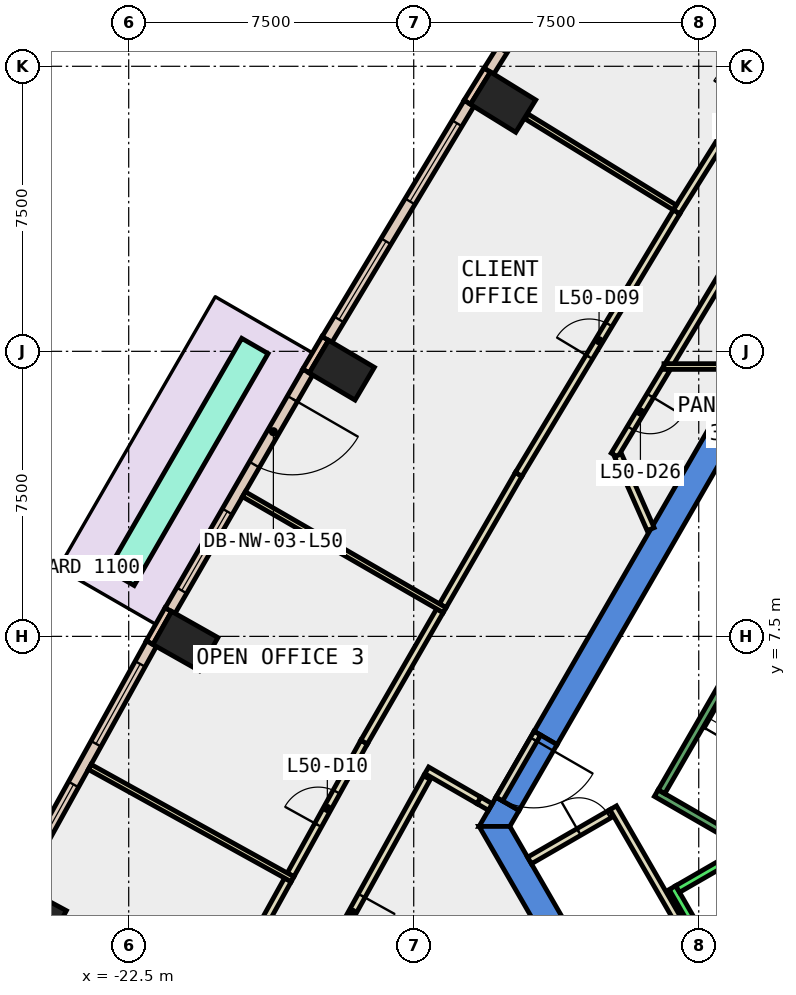
"""IFC4 building model, lengths in metres.
Left out: names, types, materials, properties, quantities, classifications, styles, units other than length and angle.
Written with IfcOpenShell. Run it as: python <this file> out.ifc"""

import sys

from ifc_helpers import new_model, si_unit, direction, frame, frame_2d, origin, origin_2d, place, context, subcontext, project, spatial, polyline, rectangle, outline, extrude, element, fill, save


model = new_model("IFC4")
c1 = context("Model", 3, precision=1e-05, world=origin(), true_north=direction((0.0, 1.0)))
c2 = subcontext(c1, "Body", "Model", "MODEL_VIEW")
j1 = project(units=[si_unit("LENGTHUNIT", "METRE"), si_unit("PLANEANGLEUNIT", "RADIAN")], contexts=[c1])
p1 = place(None, origin())
s1 = spatial("IfcSite", under=j1, at=p1, CompositionType="ELEMENT")
p2 = place(p1, origin())
s2 = spatial("IfcBuilding", under=s1, at=p2, CompositionType="ELEMENT")
p3 = place(p2, frame((0.0, 0.0, 223.4)))
s3 = spatial("IfcBuildingStorey", under=s2, at=p3, CompositionType="ELEMENT", Elevation=223.4)
for number, where, z_axis, x_axis in (
    (1, (-12.648, 21.557, -0.4), (0.0, 0.0, 1.0), (0.525, 0.851, 0.0)),
    (2, (-16.892, 14.504, -0.4), (0.0, 0.0, 1.0), (0.509, 0.861, 0.0)),
    (3, (-21.007, 7.377, -0.4), (0.0, 0.0, 1.0), (0.491, 0.871, 0.0)),
    (4, (-24.993, 0.175, -0.4), (0.0, 0.0, 1.0), (0.474, 0.88, 0.0)),
):
    element("IfcColumn", number, at=place(p3, frame(where, z_axis=z_axis, x_axis=x_axis)), inside=s3, PredefinedType="COLUMN", context=c2, shape_type="SweptSolid", body=[
        extrude(rectangle(XDim=1.0, YDim=1.4, at=origin_2d()), origin(), (0.0, 0.0, 1.0), 4.2),
    ])
p4 = place(p3, frame((0.0, 0.0, -0.4)))
e5 = element("IfcWall", 5, at=p4, inside=s3, PredefinedType="SHEAR", context=c2, shape_type="SweptSolid", body=[
    extrude(outline(polyline([(-11.834, 5.002), (-11.228, 4.652), (-6.235, 13.3), (-6.64, 14.0), (-11.834, 5.002)])), origin(), (0.0, 0.0, 1.0), 4.2),
])
p5 = place(p3, frame((0.0, 0.0, -0.4)))
e6 = element("IfcWall", 6, at=p5, inside=s3, PredefinedType="SHEAR", context=c2, shape_type="SweptSolid", body=[
    extrude(outline(polyline([(-12.228, 2.92), (-12.834, 3.27), (-13.279, 2.5), (-12.471, 2.5), (-12.228, 2.92)])), origin(), (0.0, 0.0, 1.0), 4.2),
])
p6 = place(p3, frame((0.0, 0.0, 3.6)))
e7 = element("IfcWall", 7, at=p6, inside=s3, PredefinedType="SHEAR", context=c2, shape_type="SweptSolid", body=[
    extrude(outline(polyline([(-12.834, 3.27), (-12.228, 2.92), (-11.228, 4.652), (-11.834, 5.002), (-12.834, 3.27)])), origin(), (0.0, 0.0, 1.0), 0.2),
])
p7 = place(p3, frame((0.0, 0.0, -0.4)))
e8 = element("IfcWall", 8, at=p7, inside=s3, PredefinedType="SHEAR", context=c2, shape_type="SweptSolid", body=[
    extrude(outline(polyline([(-13.279, 2.5), (-6.64, -9.0), (-6.235, -8.3), (-12.471, 2.5), (-13.279, 2.5)])), origin(), (0.0, 0.0, 1.0), 4.2),
])
p8 = place(p3, frame((-13.066, 22.403, 0.0), z_axis=(0.0, 0.0, 1.0), x_axis=(-0.525825307325, -0.850592585306, 0.0)))
e9 = element("IfcWall", 9, at=p8, inside=s3, PredefinedType="STANDARD", context=c2, shape_type="SweptSolid", body=[
    extrude(rectangle(XDim=1.0, YDim=0.2, at=frame_2d((0.5, 0.0))), origin(), (0.0, 0.0, 1.0), 3.8),
])
p9 = place(p3, frame((-17.327, 15.342, 0.0), z_axis=(0.0, 0.0, 1.0), x_axis=(-0.508161541526, -0.861261776531, 0.0)))
e10 = element("IfcWall", 10, at=p9, inside=s3, PredefinedType="STANDARD", context=c2, shape_type="SweptSolid", body=[
    extrude(rectangle(XDim=1.0, YDim=0.2, at=frame_2d((0.5, 0.0))), origin(), (0.0, 0.0, 1.0), 3.8),
])
p10 = place(p3, frame((-21.458, 8.205, 0.0), z_axis=(0.0, 0.0, 1.0), x_axis=(-0.491743606947, -0.87074004446, 0.0)))
e11 = element("IfcWall", 11, at=p10, inside=s3, PredefinedType="STANDARD", context=c2, shape_type="SweptSolid", body=[
    extrude(rectangle(XDim=1.0, YDim=0.2, at=frame_2d((0.5, 0.0))), origin(), (0.0, 0.0, 1.0), 3.8),
])
p11 = place(p3, frame((-9.122, 28.592, 0.0), z_axis=(0.0, 0.0, 1.0), x_axis=(-0.531239262679, -0.847221839773, 0.0)))
e12 = element("IfcWall", 12, at=p11, inside=s3, PredefinedType="STANDARD", context=c2, shape_type="SweptSolid", body=[
    extrude(rectangle(XDim=7.339, YDim=0.3, at=frame_2d((3.67, 0.0))), origin(), (0.0, 0.0, 1.0), 3.8),
])
p12 = place(p11, frame((0.635, 0.0, 0.9)))
e13 = element("IfcOpeningElement", 13, at=p12, cuts=e12, PredefinedType="OPENING", context=c2, shape_type="SweptSolid", body=[
    extrude(rectangle(XDim=2.4, YDim=2.6, at=frame_2d((1.2, 1.3))), frame((0.0, 0.16, 0.0), z_axis=(0.0, -1.0, 0.0), x_axis=(1.0, 0.0, 0.0)), (0.0, 0.0, 1.0), 0.32),
])
p13 = place(p11, frame((4.304, 0.0, 0.9)))
e14 = element("IfcOpeningElement", 14, at=p13, cuts=e12, PredefinedType="OPENING", context=c2, shape_type="SweptSolid", body=[
    extrude(rectangle(XDim=2.4, YDim=2.6, at=frame_2d((1.2, 1.3))), frame((0.0, 0.16, 0.0), z_axis=(0.0, -1.0, 0.0), x_axis=(1.0, 0.0, 0.0)), (0.0, 0.0, 1.0), 0.32),
])
p14 = place(p3, frame((-13.544, 21.524, 0.0), z_axis=(0.0, 0.0, 1.0), x_axis=(-0.515560283412, -0.856853309597, 0.0)))
e15 = element("IfcWall", 15, at=p14, inside=s3, PredefinedType="STANDARD", context=c2, shape_type="SweptSolid", body=[
    extrude(rectangle(XDim=7.249, YDim=0.3, at=frame_2d((3.624, 0.0))), origin(), (0.0, 0.0, 1.0), 3.8),
])
p15 = place(p14, frame((0.612, 0.0, 0.9)))
e16 = element("IfcOpeningElement", 16, at=p15, cuts=e15, PredefinedType="OPENING", context=c2, shape_type="SweptSolid", body=[
    extrude(rectangle(XDim=2.4, YDim=2.6, at=frame_2d((1.2, 1.3))), frame((0.0, 0.16, 0.0), z_axis=(0.0, -1.0, 0.0), x_axis=(1.0, 0.0, 0.0)), (0.0, 0.0, 1.0), 0.32),
])
p16 = place(p14, frame((4.236, 0.0, 0.9)))
e17 = element("IfcOpeningElement", 17, at=p16, cuts=e15, PredefinedType="OPENING", context=c2, shape_type="SweptSolid", body=[
    extrude(rectangle(XDim=2.4, YDim=2.6, at=frame_2d((1.2, 1.3))), frame((0.0, 0.16, 0.0), z_axis=(0.0, -1.0, 0.0), x_axis=(1.0, 0.0, 0.0)), (0.0, 0.0, 1.0), 0.32),
])
p17 = place(p3, frame((-17.787, 14.454, 0.0), z_axis=(0.0, 0.0, 1.0), x_axis=(-0.499968351115, -0.866043675505, 0.0)))
e18 = element("IfcWall", 18, at=p17, inside=s3, PredefinedType="STANDARD", context=c2, shape_type="SweptSolid", body=[
    extrude(rectangle(XDim=7.248, YDim=0.3, at=frame_2d((3.624, 0.0))), origin(), (0.0, 0.0, 1.0), 3.8),
])
p18 = place(p17, frame((0.812, 0.0, 0.0)))
e19 = element("IfcOpeningElement", 19, at=p18, cuts=e18, PredefinedType="OPENING", context=c2, shape_type="SweptSolid", body=[
    extrude(rectangle(XDim=2.0, YDim=2.4, at=frame_2d((1.0, 1.2))), frame((0.0, 0.16, 0.0), z_axis=(0.0, -1.0, 0.0), x_axis=(1.0, 0.0, 0.0)), (0.0, 0.0, 1.0), 0.32),
])
p19 = place(p17, frame((4.236, 0.0, 0.9)))
e20 = element("IfcOpeningElement", 20, at=p19, cuts=e18, PredefinedType="OPENING", context=c2, shape_type="SweptSolid", body=[
    extrude(rectangle(XDim=2.4, YDim=2.6, at=frame_2d((1.2, 1.3))), frame((0.0, 0.16, 0.0), z_axis=(0.0, -1.0, 0.0), x_axis=(1.0, 0.0, 0.0)), (0.0, 0.0, 1.0), 0.32),
])
p20 = place(p3, frame((-21.902, 7.309, 0.0), z_axis=(0.0, 0.0, 1.0), x_axis=(-0.484163461668, -0.87497756679, 0.0)))
e21 = element("IfcWall", 21, at=p20, inside=s3, PredefinedType="STANDARD", context=c2, shape_type="SweptSolid", body=[
    extrude(rectangle(XDim=7.247, YDim=0.3, at=frame_2d((3.624, 0.0))), origin(), (0.0, 0.0, 1.0), 3.8),
])
p21 = place(p20, frame((0.612, 0.0, 0.9)))
e22 = element("IfcOpeningElement", 22, at=p21, cuts=e21, PredefinedType="OPENING", context=c2, shape_type="SweptSolid", body=[
    extrude(rectangle(XDim=2.4, YDim=2.6, at=frame_2d((1.2, 1.3))), frame((0.0, 0.16, 0.0), z_axis=(0.0, -1.0, 0.0), x_axis=(1.0, 0.0, 0.0)), (0.0, 0.0, 1.0), 0.32),
])
p22 = place(p20, frame((4.235, 0.0, 0.9)))
e23 = element("IfcOpeningElement", 23, at=p22, cuts=e21, PredefinedType="OPENING", context=c2, shape_type="SweptSolid", body=[
    extrude(rectangle(XDim=2.4, YDim=2.6, at=frame_2d((1.2, 1.3))), frame((0.0, 0.16, 0.0), z_axis=(0.0, -1.0, 0.0), x_axis=(1.0, 0.0, 0.0)), (0.0, 0.0, 1.0), 0.32),
])
p23 = place(p3, frame((-19.179, 15.142, 0.0), z_axis=(0.0, 0.0, 1.0), x_axis=(-0.500036321933, -0.866004432291, 0.0)))
e24 = element("IfcWall", 24, at=p23, inside=s3, PredefinedType="STANDARD", context=c2, shape_type="SweptSolid", body=[
    extrude(rectangle(XDim=7.047, YDim=0.8, at=frame_2d((3.524, 0.0))), origin(), (0.0, 0.0, 1.0), 0.8),
])
p24 = place(p3, frame((-8.353, 14.536, 0.0), z_axis=(0.0, 0.0, 1.0), x_axis=(-0.515636196259, -0.856807628997, 0.0)))
e25 = element("IfcWall", 25, at=p24, inside=s3, PredefinedType="PARTITIONING", context=c2, shape_type="SweptSolid", body=[
    extrude(rectangle(XDim=2.643, YDim=0.2, at=frame_2d((1.322, 0.0))), origin(), (0.0, 0.0, 1.0), 3.8),
])
p25 = place(p24, frame((0.822, 0.0, 0.0)))
e26 = element("IfcOpeningElement", 26, at=p25, cuts=e25, PredefinedType="OPENING", context=c2, shape_type="SweptSolid", body=[
    extrude(rectangle(XDim=1.0, YDim=2.1, at=frame_2d((0.5, 1.05))), frame((0.0, 0.11, 0.0), z_axis=(0.0, -1.0, 0.0), x_axis=(1.0, 0.0, 0.0)), (0.0, 0.0, 1.0), 0.22),
])
p26 = place(p3, frame((-9.624, 12.265, 0.0), z_axis=(0.0, 0.0, 1.0), x_axis=(0.404081180606, -0.914723127225, 0.0)))
e27 = element("IfcWall", 27, at=p26, inside=s3, PredefinedType="PARTITIONING", context=c2, shape_type="SweptSolid", body=[
    extrude(rectangle(XDim=2.126, YDim=0.2, at=frame_2d((1.063, 0.0))), origin(), (0.0, 0.0, 1.0), 3.8),
])
p27 = place(p3, frame((-6.427, 17.738, 0.0), z_axis=(0.0, 0.0, 1.0), x_axis=(-0.515416266777, -0.85693994652, 0.0)))
e28 = element("IfcWall", 28, at=p27, inside=s3, PredefinedType="PARTITIONING", context=c2, shape_type="SweptSolid", body=[
    extrude(rectangle(XDim=3.587, YDim=0.2, at=frame_2d((1.793, 0.0))), origin(), (0.0, 0.0, 1.0), 3.8),
])
p28 = place(p3, frame((-12.984, 3.01, 0.0), z_axis=(0.0, 0.0, 1.0), x_axis=(-0.866046247233, 0.49996389635, 0.0)))
e29 = element("IfcWall", 29, at=p28, inside=s3, PredefinedType="PARTITIONING", context=c2, shape_type="SweptSolid", body=[
    extrude(rectangle(XDim=0.35, YDim=0.2, at=frame_2d((0.175, 0.0))), origin(), (0.0, 0.0, 1.0), 2.4),
])
p29 = place(p3, frame((-14.652, 3.783, 0.0), z_axis=(0.0, 0.0, 1.0), x_axis=(-0.484249955458, -0.874929700398, 0.0)))
e30 = element("IfcWall", 30, at=p29, inside=s3, PredefinedType="PARTITIONING", context=c2, shape_type="SweptSolid", body=[
    extrude(rectangle(XDim=8.099, YDim=0.2, at=frame_2d((4.049, 0.0))), origin(), (0.0, 0.0, 1.0), 3.8),
])
p30 = place(p29, frame((3.55, 0.0, 0.0)))
e31 = element("IfcOpeningElement", 31, at=p30, cuts=e30, PredefinedType="OPENING", context=c2, shape_type="SweptSolid", body=[
    extrude(rectangle(XDim=1.0, YDim=2.1, at=frame_2d((0.5, 1.05))), frame((0.0, 0.11, 0.0), z_axis=(0.0, -1.0, 0.0), x_axis=(1.0, 0.0, 0.0)), (0.0, 0.0, 1.0), 0.22),
])
p31 = place(p3, frame((-8.086, 18.669, 0.0), z_axis=(0.0, 0.0, 1.0), x_axis=(0.531329962263, 0.847164961033, 0.0)))
e32 = element("IfcWall", 32, at=p31, inside=s3, PredefinedType="PARTITIONING", context=c2, shape_type="SweptSolid", body=[
    extrude(rectangle(XDim=7.91, YDim=0.2, at=frame_2d((3.955, 0.0))), origin(), (0.0, 0.0, 1.0), 3.8),
])
p32 = place(p31, frame((3.455, 0.0, 0.0)))
e33 = element("IfcOpeningElement", 33, at=p32, cuts=e32, PredefinedType="OPENING", context=c2, shape_type="SweptSolid", body=[
    extrude(rectangle(XDim=1.0, YDim=2.1, at=frame_2d((0.5, 1.05))), frame((0.0, 0.11, 0.0), z_axis=(0.0, -1.0, 0.0), x_axis=(1.0, 0.0, 0.0)), (0.0, 0.0, 1.0), 0.22),
])
p33 = place(p3, frame((-14.236, 8.305, 0.0), z_axis=(0.0, 0.0, 1.0), x_axis=(0.500110539333, 0.865961574464, 0.0)))
e34 = element("IfcWall", 34, at=p33, inside=s3, PredefinedType="PARTITIONING", context=c2, shape_type="SweptSolid", body=[
    extrude(rectangle(XDim=3.993, YDim=0.2, at=frame_2d((1.997, 0.0))), origin(), (0.0, 0.0, 1.0), 3.8),
])
p34 = place(p3, frame((-12.239, 11.763, 0.0), z_axis=(0.0, 0.0, 1.0), x_axis=(0.515591302858, 0.856834644734, 0.0)))
e35 = element("IfcWall", 35, at=p34, inside=s3, PredefinedType="PARTITIONING", context=c2, shape_type="SweptSolid", body=[
    extrude(rectangle(XDim=8.059, YDim=0.2, at=frame_2d((4.029, 0.0))), origin(), (0.0, 0.0, 1.0), 3.8),
])
p35 = place(p34, frame((3.604, 0.0, 0.0)))
e36 = element("IfcOpeningElement", 36, at=p35, cuts=e35, PredefinedType="OPENING", context=c2, shape_type="SweptSolid", body=[
    extrude(rectangle(XDim=1.0, YDim=2.1, at=frame_2d((0.5, 1.05))), frame((0.0, 0.11, 0.0), z_axis=(0.0, -1.0, 0.0), x_axis=(1.0, 0.0, 0.0)), (0.0, 0.0, 1.0), 0.22),
])
p36 = place(p3, frame((-18.24, 1.225, 0.0), z_axis=(0.0, 0.0, 1.0), x_axis=(0.484411997038, 0.874839995156, 0.0)))
e37 = element("IfcWall", 37, at=p36, inside=s3, PredefinedType="PARTITIONING", context=c2, shape_type="SweptSolid", body=[
    extrude(rectangle(XDim=3.993, YDim=0.2, at=frame_2d((1.996, 0.0))), origin(), (0.0, 0.0, 1.0), 3.8),
])
p37 = place(p36, frame((1.496, 0.0, 0.0)))
e38 = element("IfcOpeningElement", 38, at=p37, cuts=e37, PredefinedType="OPENING", context=c2, shape_type="SweptSolid", body=[
    extrude(rectangle(XDim=1.0, YDim=2.1, at=frame_2d((0.5, 1.05))), frame((0.0, 0.11, 0.0), z_axis=(0.0, -1.0, 0.0), x_axis=(1.0, 0.0, 0.0)), (0.0, 0.0, 1.0), 0.22),
])
for number, where, z_axis, x_axis in (
    (39, (-16.306, 4.718, 0.0), (0.0, 0.0, 1.0), (0.5, 0.866, 0.0)),
    (40, (-20.245, -2.398, 0.0), (0.0, 0.0, 1.0), (0.484, 0.875, 0.0)),
):
    element("IfcWall", number, at=place(p3, frame(where, z_axis=z_axis, x_axis=x_axis)), inside=s3, PredefinedType="PARTITIONING", context=c2, shape_type="SweptSolid", body=[
        extrude(rectangle(XDim=3.991, YDim=0.2, at=frame_2d((1.996, 0.0))), origin(), (0.0, 0.0, 1.0), 3.8),
    ])
p38 = place(p3, frame((-11.953, 1.603, 0.0), z_axis=(0.0, 0.0, 1.0), x_axis=(0.865998541277, 0.500046524342, 0.0)))
e41 = element("IfcWall", 41, at=p38, inside=s3, PredefinedType="PARTITIONING", context=c2, shape_type="SweptSolid", body=[
    extrude(rectangle(XDim=2.5, YDim=0.2, at=frame_2d((1.25, 0.0))), origin(), (0.0, 0.0, 1.0), 3.8),
])
p39 = place(p38, frame((1.5, 0.0, 0.0)))
e42 = element("IfcOpeningElement", 42, at=p39, cuts=e41, PredefinedType="OPENING", context=c2, shape_type="SweptSolid", body=[
    extrude(rectangle(XDim=0.9, YDim=2.1, at=frame_2d((0.45, 1.05))), frame((0.0, 0.11, 0.0), z_axis=(0.0, -1.0, 0.0), x_axis=(1.0, 0.0, 0.0)), (0.0, 0.0, 1.0), 0.22),
])
p40 = place(p3, frame((-9.751, 2.99, 0.0), z_axis=(0.0, 0.0, 1.0), x_axis=(0.499955951776, -0.866050833545, 0.0)))
e43 = element("IfcWall", 43, at=p40, inside=s3, PredefinedType="PARTITIONING", context=c2, shape_type="SweptSolid", body=[
    extrude(rectangle(XDim=5.4, YDim=0.2, at=frame_2d((2.7, 0.0))), origin(), (0.0, 0.0, 1.0), 3.8),
])
p41 = place(p3, frame((-4.245, 14.6, 0.0), z_axis=(0.0, 0.0, 1.0), x_axis=(-1.0, 0.0, 0.0)))
e44 = element("IfcWall", 44, at=p41, inside=s3, PredefinedType="PARTITIONING", context=c2, shape_type="SweptSolid", body=[
    extrude(rectangle(XDim=4.17, YDim=0.15, at=frame_2d((2.085, 0.0))), origin(), (0.0, 0.0, 1.0), 3.8),
])
p42 = place(p3, frame((-8.131, 18.784, 0.0), z_axis=(0.0, 0.0, 1.0), x_axis=(-0.851969320918, 0.52359170755, 0.0)))
e45 = element("IfcWall", 45, at=p42, inside=s3, PredefinedType="PARTITIONING", context=c2, shape_type="SweptSolid", body=[
    extrude(rectangle(XDim=4.58, YDim=0.15, at=frame_2d((2.29, 0.0))), origin(), (0.0, 0.0, 1.0), 3.8),
])
p43 = place(p3, frame((-14.187, 8.19, 0.0), z_axis=(0.0, 0.0, 1.0), x_axis=(-0.865990270311, 0.500060848024, 0.0)))
e46 = element("IfcWall", 46, at=p43, inside=s3, PredefinedType="PARTITIONING", context=c2, shape_type="SweptSolid", body=[
    extrude(rectangle(XDim=6.099, YDim=0.15, at=frame_2d((3.05, 0.0))), origin(), (0.0, 0.0, 1.0), 3.8),
])
p44 = place(p3, frame((-18.189, 1.111, 0.0), z_axis=(0.0, 0.0, 1.0), x_axis=(-0.874928335558, 0.484252421405, 0.0)))
e47 = element("IfcWall", 47, at=p44, inside=s3, PredefinedType="PARTITIONING", context=c2, shape_type="SweptSolid", body=[
    extrude(rectangle(XDim=6.1, YDim=0.15, at=frame_2d((3.05, 0.0))), origin(), (0.0, 0.0, 1.0), 3.8),
])
p45 = place(p3, frame((-11.747, 4.952, 0.0), z_axis=(0.0, 0.0, 1.0), x_axis=(-0.50002537861, -0.866010750942, 0.0)))
e48 = element("IfcWall", 48, at=p45, inside=s3, PredefinedType="PARTITIONING", context=c2, shape_type="SweptSolid", body=[
    extrude(rectangle(XDim=2.0, YDim=0.2, at=frame_2d((1.0, 0.0))), origin(), (0.0, 0.0, 1.0), 2.4),
])
p46 = place(p45, frame((0.19, 0.0, 0.0)))
e49 = element("IfcOpeningElement", 49, at=p46, cuts=e48, PredefinedType="OPENING", context=c2, shape_type="SweptSolid", body=[
    extrude(rectangle(XDim=1.8, YDim=2.1, at=frame_2d((0.9, 1.05))), frame((0.0, 0.11, 0.0), z_axis=(0.0, -1.0, 0.0), x_axis=(1.0, 0.0, 0.0)), (0.0, 0.0, 1.0), 0.22),
])
p47 = place(p3, frame((-13.287, 3.185, 0.0), z_axis=(0.0, 0.0, 1.0), x_axis=(-0.865992812752, 0.500056445075, 0.0)))
e50 = element("IfcWall", 50, at=p47, inside=s3, PredefinedType="PARTITIONING", context=c2, shape_type="SweptSolid", body=[
    extrude(rectangle(XDim=1.582, YDim=0.2, at=frame_2d((0.791, 0.0))), origin(), (0.0, 0.0, 1.0), 3.8),
])
p48 = place(p3, frame((-8.192, 0.888, 0.0), z_axis=(0.0, 0.0, 1.0), x_axis=(0.500034260056, -0.866005622828, 0.0)))
e51 = element("IfcWall", 51, at=p48, inside=s3, PredefinedType="STANDARD", context=c2, shape_type="SweptSolid", body=[
    extrude(rectangle(XDim=5.399, YDim=0.2, at=frame_2d((2.7, 0.0))), origin(), (0.0, 0.0, 1.0), 3.8),
])
p49 = place(p3, frame((-5.977, 2.052, 0.0), z_axis=(0.0, 0.0, 1.0), x_axis=(-0.865973769406, -0.500089422704, 0.0)))
e52 = element("IfcWall", 52, at=p49, inside=s3, PredefinedType="STANDARD", context=c2, shape_type="SweptSolid", body=[
    extrude(rectangle(XDim=2.399, YDim=0.2, at=frame_2d((1.2, 0.0))), origin(), (0.0, 0.0, 1.0), 3.8),
])
p50 = place(p3, frame((-6.25, 2.01, 0.0), z_axis=(0.0, 0.0, 1.0), x_axis=(-0.86611865017, 0.499838457731, 0.0)))
e53 = element("IfcWall", 53, at=p50, inside=s3, PredefinedType="STANDARD", context=c2, shape_type="SweptSolid", body=[
    extrude(rectangle(XDim=2.733, YDim=0.2, at=frame_2d((1.366, 0.0))), origin(), (0.0, 0.0, 1.0), 3.8),
])
p51 = place(p3, frame((-5.03, 9.388, 0.0), z_axis=(0.0, 0.0, 1.0), x_axis=(-0.499978703459, -0.866037698999, 0.0)))
e54 = element("IfcWall", 54, at=p51, inside=s3, PredefinedType="STANDARD", context=c2, shape_type="SweptSolid", body=[
    extrude(rectangle(XDim=6.9, YDim=0.2, at=frame_2d((3.45, 0.0))), origin(), (0.0, 0.0, 1.0), 3.8),
])
p52 = place(p15, origin())
e55 = element("IfcWindow", 55, at=p52, inside=s3, PartitioningType="SINGLE_PANEL", PredefinedType="WINDOW", context=c2, shape_type="SweptSolid", body=[
    extrude(rectangle(XDim=2.4, YDim=2.6, at=frame_2d((1.2, 1.3))), frame((0.0, 0.03, 0.0), z_axis=(0.0, -1.0, 0.0), x_axis=(1.0, 0.0, 0.0)), (0.0, 0.0, 1.0), 0.06),
])
fill(e16, e55)
p53 = place(p16, origin())
e56 = element("IfcWindow", 56, at=p53, inside=s3, PartitioningType="SINGLE_PANEL", PredefinedType="WINDOW", context=c2, shape_type="SweptSolid", body=[
    extrude(rectangle(XDim=2.4, YDim=2.6, at=frame_2d((1.2, 1.3))), frame((0.0, 0.03, 0.0), z_axis=(0.0, -1.0, 0.0), x_axis=(1.0, 0.0, 0.0)), (0.0, 0.0, 1.0), 0.06),
])
fill(e17, e56)
p54 = place(p18, origin())
e57 = element("IfcDoor", 57, at=p54, inside=s3, OperationType="SLIDING_TO_LEFT", PredefinedType="DOOR", context=c2, shape_type="SweptSolid", body=[
    extrude(rectangle(XDim=2.0, YDim=2.4, at=frame_2d((1.0, 1.2))), frame((0.0, 0.025, 0.0), z_axis=(0.0, -1.0, 0.0), x_axis=(1.0, 0.0, 0.0)), (0.0, 0.0, 1.0), 0.05),
])
fill(e19, e57)
p55 = place(p19, origin())
e58 = element("IfcWindow", 58, at=p55, inside=s3, PartitioningType="SINGLE_PANEL", PredefinedType="WINDOW", context=c2, shape_type="SweptSolid", body=[
    extrude(rectangle(XDim=2.4, YDim=2.6, at=frame_2d((1.2, 1.3))), frame((0.0, 0.03, 0.0), z_axis=(0.0, -1.0, 0.0), x_axis=(1.0, 0.0, 0.0)), (0.0, 0.0, 1.0), 0.06),
])
fill(e20, e58)
p56 = place(p21, origin())
e59 = element("IfcWindow", 59, at=p56, inside=s3, PartitioningType="SINGLE_PANEL", PredefinedType="WINDOW", context=c2, shape_type="SweptSolid", body=[
    extrude(rectangle(XDim=2.4, YDim=2.6, at=frame_2d((1.2, 1.3))), frame((0.0, 0.03, 0.0), z_axis=(0.0, -1.0, 0.0), x_axis=(1.0, 0.0, 0.0)), (0.0, 0.0, 1.0), 0.06),
])
fill(e22, e59)
p57 = place(p22, origin())
e60 = element("IfcWindow", 60, at=p57, inside=s3, PartitioningType="SINGLE_PANEL", PredefinedType="WINDOW", context=c2, shape_type="SweptSolid", body=[
    extrude(rectangle(XDim=2.4, YDim=2.6, at=frame_2d((1.2, 1.3))), frame((0.0, 0.03, 0.0), z_axis=(0.0, -1.0, 0.0), x_axis=(1.0, 0.0, 0.0)), (0.0, 0.0, 1.0), 0.06),
])
fill(e23, e60)
p58 = place(p35, origin())
e61 = element("IfcDoor", 61, at=p58, inside=s3, OperationType="SINGLE_SWING_RIGHT", PredefinedType="DOOR", context=c2, shape_type="SweptSolid", body=[
    extrude(rectangle(XDim=1.0, YDim=2.1, at=frame_2d((0.5, 1.05))), frame((0.0, 0.025, 0.0), z_axis=(0.0, -1.0, 0.0), x_axis=(1.0, 0.0, 0.0)), (0.0, 0.0, 1.0), 0.05),
])
fill(e36, e61)
p59 = place(p37, origin())
e62 = element("IfcDoor", 62, at=p59, inside=s3, OperationType="SINGLE_SWING_LEFT", PredefinedType="DOOR", context=c2, shape_type="SweptSolid", body=[
    extrude(rectangle(XDim=1.0, YDim=2.1, at=frame_2d((0.5, 1.05))), frame((0.0, 0.025, 0.0), z_axis=(0.0, -1.0, 0.0), x_axis=(1.0, 0.0, 0.0)), (0.0, 0.0, 1.0), 0.05),
])
fill(e38, e62)
p60 = place(p30, origin())
e63 = element("IfcDoor", 63, at=p60, inside=s3, OperationType="SINGLE_SWING_LEFT", PredefinedType="DOOR", context=c2, shape_type="SweptSolid", body=[
    extrude(rectangle(XDim=1.0, YDim=2.1, at=frame_2d((0.5, 1.05))), frame((0.0, 0.025, 0.0), z_axis=(0.0, -1.0, 0.0), x_axis=(1.0, 0.0, 0.0)), (0.0, 0.0, 1.0), 0.05),
])
fill(e31, e63)
p61 = place(p25, origin())
e64 = element("IfcDoor", 64, at=p61, inside=s3, OperationType="SINGLE_SWING_LEFT", PredefinedType="DOOR", context=c2, shape_type="SweptSolid", body=[
    extrude(rectangle(XDim=1.0, YDim=2.1, at=frame_2d((0.5, 1.05))), frame((0.0, 0.025, 0.0), z_axis=(0.0, -1.0, 0.0), x_axis=(1.0, 0.0, 0.0)), (0.0, 0.0, 1.0), 0.05),
])
fill(e26, e64)
p62 = place(p39, origin())
e65 = element("IfcDoor", 65, at=p62, inside=s3, OperationType="SINGLE_SWING_LEFT", PredefinedType="DOOR", context=c2, shape_type="SweptSolid", body=[
    extrude(rectangle(XDim=0.9, YDim=2.1, at=frame_2d((0.45, 1.05))), frame((0.0, 0.025, 0.0), z_axis=(0.0, -1.0, 0.0), x_axis=(1.0, 0.0, 0.0)), (0.0, 0.0, 1.0), 0.05),
])
fill(e42, e65)
p63 = place(p46, origin())
e66 = element("IfcDoor", 66, at=p63, inside=s3, OperationType="DOUBLE_DOOR_SINGLE_SWING", PredefinedType="DOOR", context=c2, shape_type="SweptSolid", body=[
    extrude(rectangle(XDim=1.8, YDim=2.1, at=frame_2d((0.9, 1.05))), frame((0.0, 0.025, 0.0), z_axis=(0.0, -1.0, 0.0), x_axis=(1.0, 0.0, 0.0)), (0.0, 0.0, 1.0), 0.05),
])
fill(e49, e66)
save(model, sys.argv[1])
